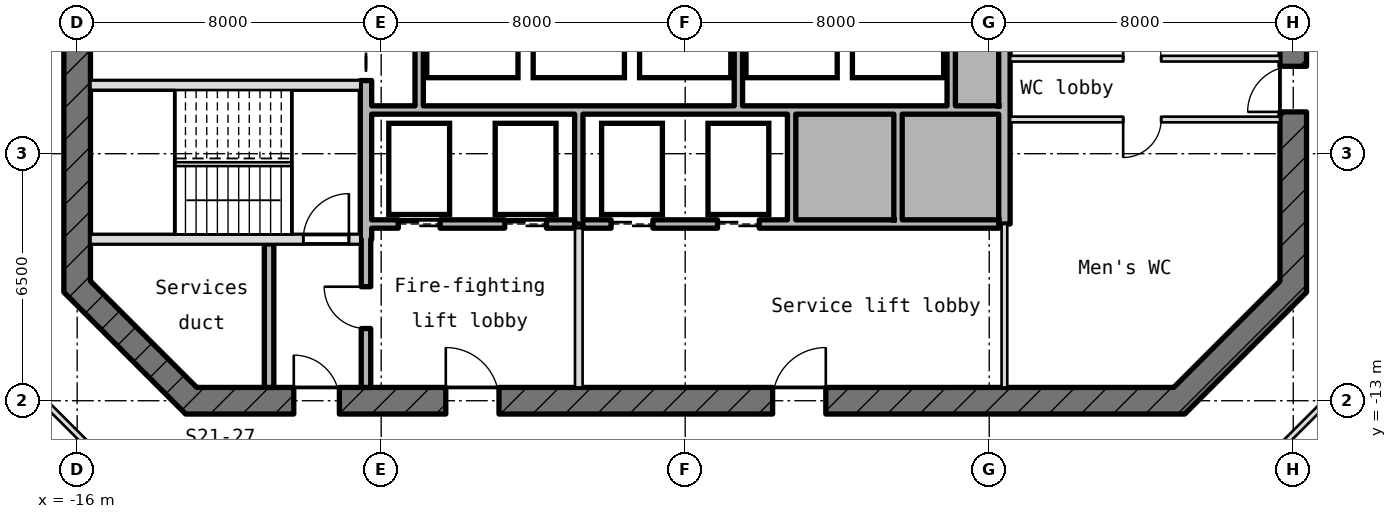
"""IFC4 building model, lengths in metres.
Left out: names, types, materials, properties, quantities, classifications, styles, units other than length and angle.
Written with IfcOpenShell. Run it as: python <this file> out.ifc"""

import sys

from ifc_helpers import new_model, si_unit, direction, frame, frame_2d, origin, place, context, subcontext, project, spatial, rectangle, extrude, element, fill, save


model = new_model("IFC4")
c1 = context("Model", 3, precision=1e-05, world=origin(), true_north=direction((0.0, 1.0)))
c2 = subcontext(c1, "Body", "Model", "MODEL_VIEW")
j1 = project(units=[si_unit("LENGTHUNIT", "METRE"), si_unit("PLANEANGLEUNIT", "RADIAN")], contexts=[c1])
p1 = place(None, origin())
s1 = spatial("IfcSite", under=j1, at=p1, CompositionType="ELEMENT")
p2 = place(p1, origin())
s2 = spatial("IfcBuilding", under=s1, at=p2, CompositionType="ELEMENT")
p3 = place(p2, frame((0.0, 0.0, 309.4)))
s3 = spatial("IfcBuildingStorey", under=s2, at=p3, CompositionType="ELEMENT", Elevation=309.4)
p4 = place(p3, frame((12.897, -13.103, -0.18), z_axis=(0.0, 0.0, 1.0), x_axis=(0.707106781187, 0.707106781187, 0.0)))
e1 = element("IfcWall", 1, at=p4, inside=s3, PredefinedType="SHEAR", context=c2, shape_type="SweptSolid", body=[
    extrude(rectangle(XDim=4.533, YDim=0.7, at=frame_2d((2.266, 0.0))), origin(), (0.0, 0.0, 1.0), 4.15),
])
p5 = place(p3, frame((16.0, -10.145, -0.18), z_axis=(0.0, 0.0, 1.0), x_axis=(0.0, 1.0, 0.0)))
e2 = element("IfcWall", 2, at=p5, inside=s3, PredefinedType="SHEAR", context=c2, shape_type="SweptSolid", body=[
    extrude(rectangle(XDim=20.29, YDim=0.7, at=frame_2d((10.145, 0.0))), origin(), (0.0, 0.0, 1.0), 4.15),
])
p6 = place(p5, frame((8.945, 0.0, 0.18)))
e3 = element("IfcOpeningElement", 3, at=p6, cuts=e2, PredefinedType="OPENING", context=c2, shape_type="SweptSolid", body=[
    extrude(rectangle(XDim=2.4, YDim=2.1, at=frame_2d((1.2, 1.05))), frame((0.0, 0.36, 0.0), z_axis=(0.0, -1.0, 0.0), x_axis=(1.0, 0.0, 0.0)), (0.0, 0.0, 1.0), 0.72),
])
p7 = place(p5, frame((13.545, 0.0, 0.18)))
e4 = element("IfcOpeningElement", 4, at=p7, cuts=e2, PredefinedType="OPENING", context=c2, shape_type="SweptSolid", body=[
    extrude(rectangle(XDim=1.2, YDim=2.1, at=frame_2d((0.6, 1.05))), frame((0.0, 0.36, 0.0), z_axis=(0.0, -1.0, 0.0), x_axis=(1.0, 0.0, 0.0)), (0.0, 0.0, 1.0), 0.72),
])
p8 = place(p5, frame((4.745, 0.0, 0.18)))
e5 = element("IfcOpeningElement", 5, at=p8, cuts=e2, PredefinedType="OPENING", context=c2, shape_type="SweptSolid", body=[
    extrude(rectangle(XDim=1.2, YDim=2.1, at=frame_2d((0.6, 1.05))), frame((0.0, 0.36, 0.0), z_axis=(0.0, -1.0, 0.0), x_axis=(1.0, 0.0, 0.0)), (0.0, 0.0, 1.0), 0.72),
])
p9 = place(p3, frame((-16.0, 10.145, -0.18), z_axis=(0.0, 0.0, 1.0), x_axis=(0.0, -1.0, 0.0)))
e6 = element("IfcWall", 6, at=p9, inside=s3, PredefinedType="SHEAR", context=c2, shape_type="SweptSolid", body=[
    extrude(rectangle(XDim=20.29, YDim=0.7, at=frame_2d((10.145, 0.0))), origin(), (0.0, 0.0, 1.0), 4.15),
])
p10 = place(p9, frame((8.945, 0.0, 0.18)))
e7 = element("IfcOpeningElement", 7, at=p10, cuts=e6, PredefinedType="OPENING", context=c2, shape_type="SweptSolid", body=[
    extrude(rectangle(XDim=2.4, YDim=2.1, at=frame_2d((1.2, 1.05))), frame((0.0, 0.36, 0.0), z_axis=(0.0, -1.0, 0.0), x_axis=(1.0, 0.0, 0.0)), (0.0, 0.0, 1.0), 0.72),
])
p11 = place(p9, frame((5.545, 0.0, 0.18)))
e8 = element("IfcOpeningElement", 8, at=p11, cuts=e6, PredefinedType="OPENING", context=c2, shape_type="SweptSolid", body=[
    extrude(rectangle(XDim=1.2, YDim=2.1, at=frame_2d((0.6, 1.05))), frame((0.0, 0.36, 0.0), z_axis=(0.0, -1.0, 0.0), x_axis=(1.0, 0.0, 0.0)), (0.0, 0.0, 1.0), 0.72),
])
p12 = place(p3, frame((-16.103, -9.897, -0.18), z_axis=(0.0, 0.0, 1.0), x_axis=(0.707106781187, -0.707106781187, 0.0)))
e9 = element("IfcWall", 9, at=p12, inside=s3, PredefinedType="SHEAR", context=c2, shape_type="SweptSolid", body=[
    extrude(rectangle(XDim=4.533, YDim=0.7, at=frame_2d((2.266, 0.0))), origin(), (0.0, 0.0, 1.0), 4.15),
])
p13 = place(p3, frame((-13.145, -13.0, -0.18), z_axis=(0.0, 0.0, 1.0), x_axis=(1.0, 0.0, 0.0)))
e10 = element("IfcWall", 10, at=p13, inside=s3, PredefinedType="SHEAR", context=c2, shape_type="SweptSolid", body=[
    extrude(rectangle(XDim=26.29, YDim=0.7, at=frame_2d((13.145, 0.0))), origin(), (0.0, 0.0, 1.0), 4.15),
])
p14 = place(p13, frame((2.845, 0.0, 0.18)))
e11 = element("IfcOpeningElement", 11, at=p14, cuts=e10, PredefinedType="OPENING", context=c2, shape_type="SweptSolid", body=[
    extrude(rectangle(XDim=1.2, YDim=2.1, at=frame_2d((0.6, 1.05))), frame((0.0, 0.36, 0.0), z_axis=(0.0, -1.0, 0.0), x_axis=(1.0, 0.0, 0.0)), (0.0, 0.0, 1.0), 0.72),
])
p15 = place(p13, frame((6.845, 0.0, 0.18)))
e12 = element("IfcOpeningElement", 12, at=p15, cuts=e10, PredefinedType="OPENING", context=c2, shape_type="SweptSolid", body=[
    extrude(rectangle(XDim=1.4, YDim=2.1, at=frame_2d((0.7, 1.05))), frame((0.0, 0.36, 0.0), z_axis=(0.0, -1.0, 0.0), x_axis=(1.0, 0.0, 0.0)), (0.0, 0.0, 1.0), 0.72),
])
p16 = place(p13, frame((15.445, 0.0, 0.18)))
e13 = element("IfcOpeningElement", 13, at=p16, cuts=e10, PredefinedType="OPENING", context=c2, shape_type="SweptSolid", body=[
    extrude(rectangle(XDim=1.4, YDim=2.1, at=frame_2d((0.7, 1.05))), frame((0.0, 0.36, 0.0), z_axis=(0.0, -1.0, 0.0), x_axis=(1.0, 0.0, 0.0)), (0.0, 0.0, 1.0), 0.72),
])
p17 = place(p3, frame((-15.65, -8.75, -0.18), z_axis=(0.0, 0.0, 1.0), x_axis=(1.0, 0.0, 0.0)))
e14 = element("IfcWall", 14, at=p17, inside=s3, PredefinedType="SHEAR", context=c2, shape_type="SweptSolid", body=[
    extrude(rectangle(XDim=7.1, YDim=0.25, at=frame_2d((3.55, 0.0))), origin(), (0.0, 0.0, 1.0), 4.15),
])
p18 = place(p17, frame((5.6, 0.0, 0.18)))
e15 = element("IfcOpeningElement", 15, at=p18, cuts=e14, PredefinedType="OPENING", context=c2, shape_type="SweptSolid", body=[
    extrude(rectangle(XDim=1.2, YDim=2.1, at=frame_2d((0.6, 1.05))), frame((0.0, 0.135, 0.0), z_axis=(0.0, -1.0, 0.0), x_axis=(1.0, 0.0, 0.0)), (0.0, 0.0, 1.0), 0.27),
])
p19 = place(p3, frame((-8.25, -8.35, 0.0), z_axis=(0.0, 0.0, 1.0), x_axis=(1.0, 0.0, 0.0)))
e16 = element("IfcWall", 16, at=p19, inside=s3, PredefinedType="STANDARD", context=c2, shape_type="SweptSolid", body=[
    extrude(rectangle(XDim=5.34, YDim=0.22, at=frame_2d((2.67, 0.0))), origin(), (0.0, 0.0, 1.0), 3.97),
])
p20 = place(p19, frame((0.7, 0.0, 0.0)))
e17 = element("IfcOpeningElement", 17, at=p20, cuts=e16, PredefinedType="OPENING", context=c2, shape_type="SweptSolid", body=[
    extrude(rectangle(XDim=1.1, YDim=2.1, at=frame_2d((0.55, 1.05))), frame((0.0, 0.12, 0.0), z_axis=(0.0, -1.0, 0.0), x_axis=(1.0, 0.0, 0.0)), (0.0, 0.0, 1.0), 0.24),
])
p21 = place(p19, frame((3.5, 0.0, 0.0)))
e18 = element("IfcOpeningElement", 18, at=p21, cuts=e16, PredefinedType="OPENING", context=c2, shape_type="SweptSolid", body=[
    extrude(rectangle(XDim=1.1, YDim=2.1, at=frame_2d((0.55, 1.05))), frame((0.0, 0.12, 0.0), z_axis=(0.0, -1.0, 0.0), x_axis=(1.0, 0.0, 0.0)), (0.0, 0.0, 1.0), 0.24),
])
p22 = place(p3, frame((-2.69, -8.35, 0.0), z_axis=(0.0, 0.0, 1.0), x_axis=(1.0, 0.0, 0.0)))
e19 = element("IfcWall", 19, at=p22, inside=s3, PredefinedType="STANDARD", context=c2, shape_type="SweptSolid", body=[
    extrude(rectangle(XDim=10.94, YDim=0.22, at=frame_2d((5.47, 0.0))), origin(), (0.0, 0.0, 1.0), 3.97),
])
p23 = place(p22, frame((0.74, 0.0, 0.0)))
e20 = element("IfcOpeningElement", 20, at=p23, cuts=e19, PredefinedType="OPENING", context=c2, shape_type="SweptSolid", body=[
    extrude(rectangle(XDim=1.1, YDim=2.1, at=frame_2d((0.55, 1.05))), frame((0.0, 0.12, 0.0), z_axis=(0.0, -1.0, 0.0), x_axis=(1.0, 0.0, 0.0)), (0.0, 0.0, 1.0), 0.24),
])
p24 = place(p22, frame((3.54, 0.0, 0.0)))
e21 = element("IfcOpeningElement", 21, at=p24, cuts=e19, PredefinedType="OPENING", context=c2, shape_type="SweptSolid", body=[
    extrude(rectangle(XDim=1.1, YDim=2.1, at=frame_2d((0.55, 1.05))), frame((0.0, 0.12, 0.0), z_axis=(0.0, -1.0, 0.0), x_axis=(1.0, 0.0, 0.0)), (0.0, 0.0, 1.0), 0.24),
])
p25 = place(p3, frame((8.55, -5.6, 0.0), z_axis=(0.0, 0.0, 1.0), x_axis=(1.0, 0.0, 0.0)))
e22 = element("IfcWall", 22, at=p25, inside=s3, PredefinedType="PARTITIONING", context=c2, shape_type="SweptSolid", body=[
    extrude(rectangle(XDim=7.1, YDim=0.15, at=frame_2d((3.55, 0.0))), origin(), (0.0, 0.0, 1.0), 3.97),
])
p26 = place(p25, frame((2.975, 0.0, 0.0)))
e23 = element("IfcOpeningElement", 23, at=p26, cuts=e22, PredefinedType="OPENING", context=c2, shape_type="SweptSolid", body=[
    extrude(rectangle(XDim=1.0, YDim=2.1, at=frame_2d((0.5, 1.05))), frame((0.0, 0.085, 0.0), z_axis=(0.0, -1.0, 0.0), x_axis=(1.0, 0.0, 0.0)), (0.0, 0.0, 1.0), 0.17),
])
p27 = place(p3, frame((-8.25, -5.35, 0.0), z_axis=(0.0, 0.0, 1.0), x_axis=(1.0, 0.0, 0.0)))
e24 = element("IfcWall", 24, at=p27, inside=s3, PredefinedType="STANDARD", context=c2, shape_type="SweptSolid", body=[
    extrude(rectangle(XDim=16.5, YDim=0.22, at=frame_2d((8.25, 0.0))), origin(), (0.0, 0.0, 1.0), 3.97),
])
p28 = place(p3, frame((-15.65, -4.7, -0.18), z_axis=(0.0, 0.0, 1.0), x_axis=(1.0, 0.0, 0.0)))
e25 = element("IfcWall", 25, at=p28, inside=s3, PredefinedType="SHEAR", context=c2, shape_type="SweptSolid", body=[
    extrude(rectangle(XDim=7.1, YDim=0.25, at=frame_2d((3.55, 0.0))), origin(), (0.0, 0.0, 1.0), 4.15),
])
p29 = place(p3, frame((8.55, -4.0, 0.0), z_axis=(0.0, 0.0, 1.0), x_axis=(1.0, 0.0, 0.0)))
e26 = element("IfcWall", 26, at=p29, inside=s3, PredefinedType="PARTITIONING", context=c2, shape_type="SweptSolid", body=[
    extrude(rectangle(XDim=7.1, YDim=0.15, at=frame_2d((3.55, 0.0))), origin(), (0.0, 0.0, 1.0), 3.97),
])
p30 = place(p29, frame((2.975, 0.0, 0.0)))
e27 = element("IfcOpeningElement", 27, at=p30, cuts=e26, PredefinedType="OPENING", context=c2, shape_type="SweptSolid", body=[
    extrude(rectangle(XDim=1.0, YDim=2.1, at=frame_2d((0.5, 1.05))), frame((0.0, 0.085, 0.0), z_axis=(0.0, -1.0, 0.0), x_axis=(1.0, 0.0, 0.0)), (0.0, 0.0, 1.0), 0.17),
])
p31 = place(p3, frame((-10.95, -12.65, 0.0), z_axis=(0.0, 0.0, 1.0), x_axis=(0.0, 1.0, 0.0)))
e28 = element("IfcWall", 28, at=p31, inside=s3, PredefinedType="STANDARD", context=c2, shape_type="SweptSolid", body=[
    extrude(rectangle(XDim=3.775, YDim=0.25, at=frame_2d((1.887, 0.0))), origin(), (0.0, 0.0, 1.0), 3.97),
])
p32 = place(p3, frame((-8.4, -12.65, 0.0), z_axis=(0.0, 0.0, 1.0), x_axis=(0.0, 1.0, 0.0)))
e29 = element("IfcWall", 29, at=p32, inside=s3, PredefinedType="STANDARD", context=c2, shape_type="SweptSolid", body=[
    extrude(rectangle(XDim=3.9, YDim=0.25, at=frame_2d((1.95, 0.0))), origin(), (0.0, 0.0, 1.0), 3.97),
])
p33 = place(p32, frame((1.55, 0.0, 0.0)))
e30 = element("IfcOpeningElement", 30, at=p33, cuts=e29, PredefinedType="OPENING", context=c2, shape_type="SweptSolid", body=[
    extrude(rectangle(XDim=1.1, YDim=2.1, at=frame_2d((0.55, 1.05))), frame((0.0, 0.135, 0.0), z_axis=(0.0, -1.0, 0.0), x_axis=(1.0, 0.0, 0.0)), (0.0, 0.0, 1.0), 0.27),
])
p34 = place(p3, frame((-8.4, -8.75, -0.18), z_axis=(0.0, 0.0, 1.0), x_axis=(0.0, 1.0, 0.0)))
e31 = element("IfcWall", 31, at=p34, inside=s3, PredefinedType="SHEAR", context=c2, shape_type="SweptSolid", body=[
    extrude(rectangle(XDim=4.175, YDim=0.3, at=frame_2d((2.087, 0.0))), origin(), (0.0, 0.0, 1.0), 4.15),
])
p35 = place(p3, frame((-7.0, -5.24, 0.0), z_axis=(0.0, 0.0, 1.0), x_axis=(0.0, 1.0, 0.0)))
e32 = element("IfcWall", 32, at=p35, inside=s3, PredefinedType="STANDARD", context=c2, shape_type="SweptSolid", body=[
    extrude(rectangle(XDim=2.74, YDim=0.22, at=frame_2d((1.37, 0.0))), origin(), (0.0, 0.0, 1.0), 3.97),
])
p36 = place(p3, frame((-2.8, -12.65, 0.0), z_axis=(0.0, 0.0, 1.0), x_axis=(0.0, 1.0, 0.0)))
e33 = element("IfcWall", 33, at=p36, inside=s3, PredefinedType="PARTITIONING", context=c2, shape_type="SweptSolid", body=[
    extrude(rectangle(XDim=4.19, YDim=0.2, at=frame_2d((2.095, 0.0))), origin(), (0.0, 0.0, 1.0), 3.97),
])
p37 = place(p3, frame((-2.8, -8.35, 0.0), z_axis=(0.0, 0.0, 1.0), x_axis=(0.0, 1.0, 0.0)))
e34 = element("IfcWall", 34, at=p37, inside=s3, PredefinedType="STANDARD", context=c2, shape_type="SweptSolid", body=[
    extrude(rectangle(XDim=2.89, YDim=0.22, at=frame_2d((1.445, 0.0))), origin(), (0.0, 0.0, 1.0), 3.97),
])
p38 = place(p3, frame((1.4, -5.24, 0.0), z_axis=(0.0, 0.0, 1.0), x_axis=(0.0, 1.0, 0.0)))
e35 = element("IfcWall", 35, at=p38, inside=s3, PredefinedType="STANDARD", context=c2, shape_type="SweptSolid", body=[
    extrude(rectangle(XDim=2.74, YDim=0.22, at=frame_2d((1.37, 0.0))), origin(), (0.0, 0.0, 1.0), 3.97),
])
for number, where, z_axis, x_axis in (
    (36, (2.8, -8.24, 0.0), (0.0, 0.0, 1.0), (0.0, 1.0, 0.0)),
    (37, (5.6, -8.24, 0.0), (0.0, 0.0, 1.0), (0.0, 1.0, 0.0)),
):
    element("IfcWall", number, at=place(p3, frame(where, z_axis=z_axis, x_axis=x_axis)), inside=s3, PredefinedType="STANDARD", context=c2, shape_type="SweptSolid", body=[
        extrude(rectangle(XDim=2.78, YDim=0.22, at=frame_2d((1.39, 0.0))), origin(), (0.0, 0.0, 1.0), 3.97),
    ])
p39 = place(p3, frame((7.0, -5.24, 0.0), z_axis=(0.0, 0.0, 1.0), x_axis=(0.0, 1.0, 0.0)))
e38 = element("IfcWall", 38, at=p39, inside=s3, PredefinedType="STANDARD", context=c2, shape_type="SweptSolid", body=[
    extrude(rectangle(XDim=2.74, YDim=0.22, at=frame_2d((1.37, 0.0))), origin(), (0.0, 0.0, 1.0), 3.97),
])
p40 = place(p3, frame((8.4, -12.65, 0.0), z_axis=(0.0, 0.0, 1.0), x_axis=(0.0, 1.0, 0.0)))
e39 = element("IfcWall", 39, at=p40, inside=s3, PredefinedType="PARTITIONING", context=c2, shape_type="SweptSolid", body=[
    extrude(rectangle(XDim=4.3, YDim=0.15, at=frame_2d((2.15, 0.0))), origin(), (0.0, 0.0, 1.0), 3.97),
])
p41 = place(p3, frame((8.4, -8.35, -0.18), z_axis=(0.0, 0.0, 1.0), x_axis=(0.0, 1.0, 0.0)))
e40 = element("IfcWall", 40, at=p41, inside=s3, PredefinedType="SHEAR", context=c2, shape_type="SweptSolid", body=[
    extrude(rectangle(XDim=5.85, YDim=0.3, at=frame_2d((2.925, 0.0))), origin(), (0.0, 0.0, 1.0), 4.15),
])
for number, where, z_axis, x_axis in (
    (41, (-14.139, -15.75, 0.0), (0.0, 0.0, 1.0), (-0.707, 0.707, 0.0)),
    (42, (18.75, -11.139, 0.0), (0.0, 0.0, 1.0), (-0.707, -0.707, 0.0)),
):
    element("IfcWall", number, at=place(p3, frame(where, z_axis=z_axis, x_axis=x_axis)), inside=s3, PredefinedType="PARTITIONING", context=c2, shape_type="SweptSolid", body=[
        extrude(rectangle(XDim=6.521, YDim=0.15, at=frame_2d((3.26, 0.0))), origin(), (0.0, 0.0, 1.0), 3.97),
    ])
p42 = place(p20, origin())
e43 = element("IfcDoor", 43, at=p42, inside=s3, OperationType="DOUBLE_DOOR_SLIDING", PredefinedType="DOOR", context=c2, shape_type="SweptSolid", body=[
    extrude(rectangle(XDim=1.1, YDim=2.1, at=frame_2d((0.55, 1.05))), frame((0.0, 0.025, 0.0), z_axis=(0.0, -1.0, 0.0), x_axis=(1.0, 0.0, 0.0)), (0.0, 0.0, 1.0), 0.05),
])
fill(e17, e43)
p43 = place(p21, origin())
e44 = element("IfcDoor", 44, at=p43, inside=s3, OperationType="DOUBLE_DOOR_SLIDING", PredefinedType="DOOR", context=c2, shape_type="SweptSolid", body=[
    extrude(rectangle(XDim=1.1, YDim=2.1, at=frame_2d((0.55, 1.05))), frame((0.0, 0.025, 0.0), z_axis=(0.0, -1.0, 0.0), x_axis=(1.0, 0.0, 0.0)), (0.0, 0.0, 1.0), 0.05),
])
fill(e18, e44)
p44 = place(p23, origin())
e45 = element("IfcDoor", 45, at=p44, inside=s3, OperationType="DOUBLE_DOOR_SLIDING", PredefinedType="DOOR", context=c2, shape_type="SweptSolid", body=[
    extrude(rectangle(XDim=1.1, YDim=2.1, at=frame_2d((0.55, 1.05))), frame((0.0, 0.025, 0.0), z_axis=(0.0, -1.0, 0.0), x_axis=(1.0, 0.0, 0.0)), (0.0, 0.0, 1.0), 0.05),
])
fill(e20, e45)
p45 = place(p24, origin())
e46 = element("IfcDoor", 46, at=p45, inside=s3, OperationType="DOUBLE_DOOR_SLIDING", PredefinedType="DOOR", context=c2, shape_type="SweptSolid", body=[
    extrude(rectangle(XDim=1.1, YDim=2.1, at=frame_2d((0.55, 1.05))), frame((0.0, 0.025, 0.0), z_axis=(0.0, -1.0, 0.0), x_axis=(1.0, 0.0, 0.0)), (0.0, 0.0, 1.0), 0.05),
])
fill(e21, e46)
p46 = place(p18, origin())
e47 = element("IfcDoor", 47, at=p46, inside=s3, OperationType="SINGLE_SWING_RIGHT", PredefinedType="DOOR", context=c2, shape_type="SweptSolid", body=[
    extrude(rectangle(XDim=1.2, YDim=2.1, at=frame_2d((0.6, 1.05))), frame((0.0, 0.025, 0.0), z_axis=(0.0, -1.0, 0.0), x_axis=(1.0, 0.0, 0.0)), (0.0, 0.0, 1.0), 0.05),
])
fill(e15, e47)
p47 = place(p33, origin())
e48 = element("IfcDoor", 48, at=p47, inside=s3, OperationType="SINGLE_SWING_RIGHT", PredefinedType="DOOR", context=c2, shape_type="SweptSolid", body=[
    extrude(rectangle(XDim=1.1, YDim=2.1, at=frame_2d((0.55, 1.05))), frame((0.0, 0.025, 0.0), z_axis=(0.0, -1.0, 0.0), x_axis=(1.0, 0.0, 0.0)), (0.0, 0.0, 1.0), 0.05),
])
fill(e30, e48)
p48 = place(p14, origin())
e49 = element("IfcDoor", 49, at=p48, inside=s3, OperationType="SINGLE_SWING_RIGHT", PredefinedType="DOOR", context=c2, shape_type="SweptSolid", body=[
    extrude(rectangle(XDim=1.2, YDim=2.1, at=frame_2d((0.6, 1.05))), frame((0.0, 0.025, 0.0), z_axis=(0.0, -1.0, 0.0), x_axis=(1.0, 0.0, 0.0)), (0.0, 0.0, 1.0), 0.05),
])
fill(e11, e49)
p49 = place(p15, origin())
e50 = element("IfcDoor", 50, at=p49, inside=s3, OperationType="SINGLE_SWING_RIGHT", PredefinedType="DOOR", context=c2, shape_type="SweptSolid", body=[
    extrude(rectangle(XDim=1.4, YDim=2.1, at=frame_2d((0.7, 1.05))), frame((0.0, 0.025, 0.0), z_axis=(0.0, -1.0, 0.0), x_axis=(1.0, 0.0, 0.0)), (0.0, 0.0, 1.0), 0.05),
])
fill(e12, e50)
p50 = place(p16, origin())
e51 = element("IfcDoor", 51, at=p50, inside=s3, OperationType="SINGLE_SWING_RIGHT", PredefinedType="DOOR", context=c2, shape_type="SweptSolid", body=[
    extrude(rectangle(XDim=1.4, YDim=2.1, at=frame_2d((0.7, 1.05))), frame((0.0, 0.025, 0.0), z_axis=(0.0, -1.0, 0.0), x_axis=(1.0, 0.0, 0.0)), (0.0, 0.0, 1.0), 0.05),
])
fill(e13, e51)
p51 = place(p30, origin())
e52 = element("IfcDoor", 52, at=p51, inside=s3, OperationType="SINGLE_SWING_RIGHT", PredefinedType="DOOR", context=c2, shape_type="SweptSolid", body=[
    extrude(rectangle(XDim=1.0, YDim=2.1, at=frame_2d((0.5, 1.05))), frame((0.0, 0.025, 0.0), z_axis=(0.0, -1.0, 0.0), x_axis=(1.0, 0.0, 0.0)), (0.0, 0.0, 1.0), 0.05),
])
fill(e27, e52)
p52 = place(p8, origin())
e53 = element("IfcDoor", 53, at=p52, inside=s3, OperationType="SINGLE_SWING_RIGHT", PredefinedType="DOOR", context=c2, shape_type="SweptSolid", body=[
    extrude(rectangle(XDim=1.2, YDim=2.1, at=frame_2d((0.6, 1.05))), frame((0.0, 0.025, 0.0), z_axis=(0.0, -1.0, 0.0), x_axis=(1.0, 0.0, 0.0)), (0.0, 0.0, 1.0), 0.05),
])
fill(e5, e53)
p53 = place(p26, frame((1.0, 0.0, 0.0), z_axis=(0.0, 0.0, 1.0), x_axis=(-1.0, 0.0, 0.0)))
e54 = element("IfcDoor", 54, at=p53, inside=s3, OperationType="SINGLE_SWING_LEFT", PredefinedType="DOOR", context=c2, shape_type="SweptSolid", body=[
    extrude(rectangle(XDim=1.0, YDim=2.1, at=frame_2d((0.5, 1.05))), frame((0.0, 0.025, 0.0), z_axis=(0.0, -1.0, 0.0), x_axis=(1.0, 0.0, 0.0)), (0.0, 0.0, 1.0), 0.05),
])
fill(e23, e54)
save(model, sys.argv[1])
